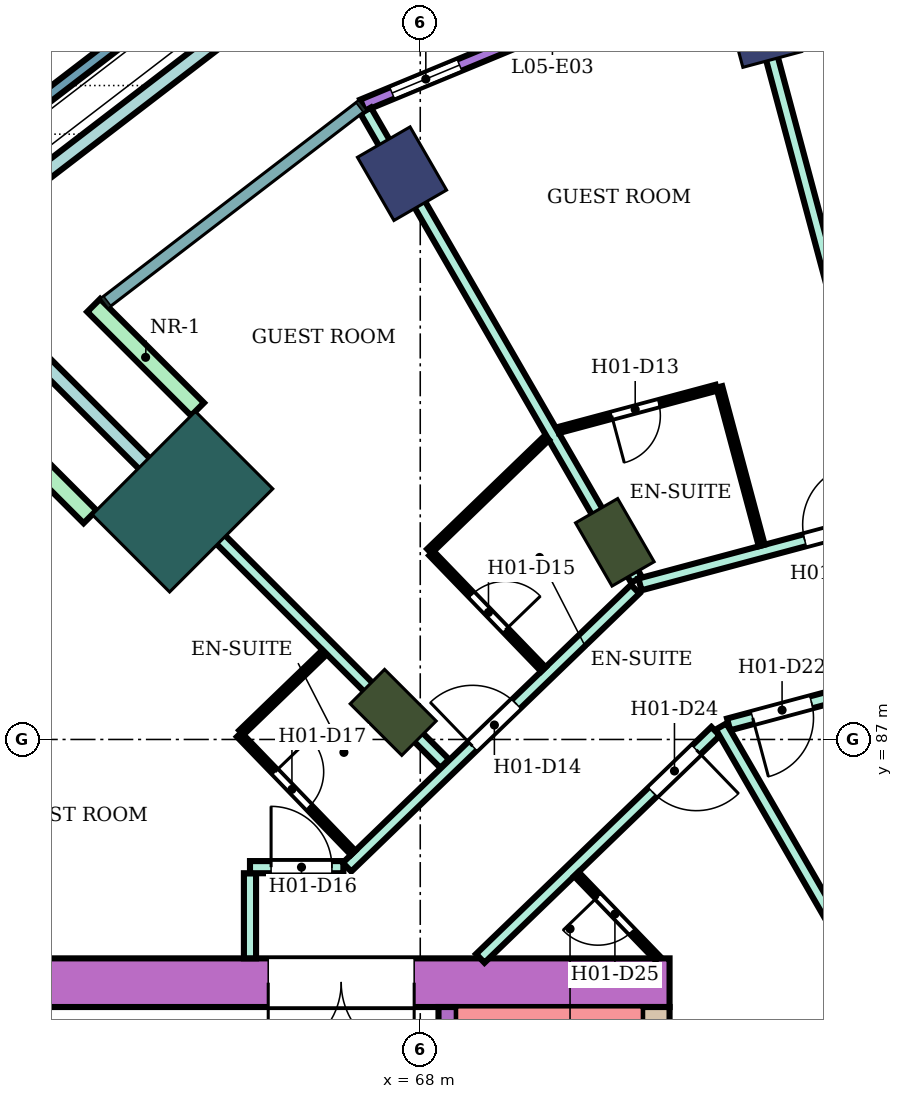
"""IFC4 building model, lengths in metres.
Left out: names, types, materials, properties, quantities, classifications, styles, units other than length and angle.
Written with IfcOpenShell. Run it as: python <this file> out.ifc"""

import sys

from ifc_helpers import new_model, si_unit, direction, frame, frame_2d, origin, origin_2d, place, context, subcontext, project, spatial, rectangle, extrude, element, fill, save


model = new_model("IFC4")
c1 = context("Model", 3, precision=1e-05, world=origin(), true_north=direction((0.0, 1.0)))
c2 = subcontext(c1, "Body", "Model", "MODEL_VIEW")
j1 = project(units=[si_unit("LENGTHUNIT", "METRE"), si_unit("PLANEANGLEUNIT", "RADIAN")], contexts=[c1])
p1 = place(None, origin())
s1 = spatial("IfcSite", under=j1, at=p1, CompositionType="ELEMENT")
p2 = place(p1, origin())
s2 = spatial("IfcBuilding", under=s1, at=p2, CompositionType="ELEMENT")
p3 = place(p2, frame((0.0, 0.0, 28.8)))
s3 = spatial("IfcBuildingStorey", under=s2, at=p3, CompositionType="ELEMENT", Elevation=28.8)
for number, where, z_axis, x_axis in (
    (1, (73.633, 98.762, 0.0), (0.0, 0.0, 1.0), (-0.259, 0.966, 0.0)),
    (2, (67.7, 96.304, 0.0), (0.0, 0.0, 1.0), (-0.5, 0.866, 0.0)),
):
    element("IfcColumn", number, at=place(p3, frame(where, z_axis=z_axis, x_axis=x_axis)), inside=s3, PredefinedType="COLUMN", context=c2, shape_type="SweptSolid", body=[
        extrude(rectangle(XDim=1.2, YDim=1.0, at=origin_2d()), origin(), (0.0, 0.0, 1.0), 3.8),
    ])
for number, where, z_axis, x_axis in (
    (3, (71.2, 90.242, 0.0), (0.0, 0.0, 1.0), (-0.5, 0.866, 0.0)),
    (4, (67.555, 87.445, 0.0), (0.0, 0.0, 1.0), (-0.707, 0.707, 0.0)),
):
    element("IfcColumn", number, at=place(p3, frame(where, z_axis=z_axis, x_axis=x_axis)), inside=s3, PredefinedType="COLUMN", context=c2, shape_type="SweptSolid", body=[
        extrude(rectangle(XDim=1.2, YDim=0.8, at=origin_2d()), origin(), (0.0, 0.0, 1.0), 3.8),
    ])
p4 = place(p3, frame((64.09, 90.91, 0.0), z_axis=(0.0, 0.0, 1.0), x_axis=(-0.707106781187, 0.707106781187, 0.0)))
e5 = element("IfcColumn", 5, at=p4, inside=s3, PredefinedType="COLUMN", context=c2, shape_type="SweptSolid", body=[
    extrude(rectangle(XDim=1.8, YDim=2.4, at=origin_2d()), origin(), (0.0, 0.0, 1.0), 3.8),
])
p5 = place(p3, frame((72.1, 83.0, 0.0), z_axis=(0.0, 0.0, 1.0), x_axis=(-1.0, 0.0, 0.0)))
e6 = element("IfcWall", 6, at=p5, inside=s3, PredefinedType="SHEAR", context=c2, shape_type="SweptSolid", body=[
    extrude(rectangle(XDim=14.7, YDim=0.8, at=frame_2d((7.35, 0.0))), origin(), (0.0, 0.0, 1.0), 3.48),
])
p6 = place(p5, frame((4.2, 0.0, 0.0)))
e7 = element("IfcOpeningElement", 7, at=p6, cuts=e6, PredefinedType="OPENING", context=c2, shape_type="SweptSolid", body=[
    extrude(rectangle(XDim=2.4, YDim=2.4, at=frame_2d((1.2, 1.2))), frame((0.0, 0.41, 0.0), z_axis=(0.0, -1.0, 0.0), x_axis=(1.0, 0.0, 0.0)), (0.0, 0.0, 1.0), 0.82),
])
p7 = place(p3, frame((71.875, 82.6, 0.0), z_axis=(0.0, 0.0, 1.0), x_axis=(0.0, -1.0, 0.0)))
e8 = element("IfcWall", 8, at=p7, inside=s3, PredefinedType="SHEAR", context=c2, shape_type="SweptSolid", body=[
    extrude(rectangle(XDim=7.6, YDim=0.45, at=frame_2d((3.8, 0.0))), origin(), (0.0, 0.0, 1.0), 3.48),
])
p8 = place(p3, frame((68.45, 82.6, 0.0), z_axis=(0.0, 0.0, 1.0), x_axis=(0.0, -1.0, 0.0)))
e9 = element("IfcWall", 9, at=p8, inside=s3, PredefinedType="SHEAR", context=c2, shape_type="SweptSolid", body=[
    extrude(rectangle(XDim=7.6, YDim=0.3, at=frame_2d((3.8, 0.0))), origin(), (0.0, 0.0, 1.0), 3.48),
])
p9 = place(p8, frame((0.25, 0.0, 0.0)))
e10 = element("IfcOpeningElement", 10, at=p9, cuts=e9, PredefinedType="OPENING", context=c2, shape_type="SweptSolid", body=[
    extrude(rectangle(XDim=0.9, YDim=2.1, at=frame_2d((0.45, 1.05))), frame((0.0, 0.16, 0.0), z_axis=(0.0, -1.0, 0.0), x_axis=(1.0, 0.0, 0.0)), (0.0, 0.0, 1.0), 0.32),
])
p10 = place(p3, frame((73.297, 100.017, 0.0), z_axis=(0.0, 0.0, 1.0), x_axis=(-0.923875115043, -0.382694096902, 0.0)))
e11 = element("IfcWall", 11, at=p10, inside=s3, PredefinedType="NOTDEFINED", context=c2, shape_type="SweptSolid", body=[
    extrude(rectangle(XDim=6.761, YDim=0.2, at=frame_2d((3.38, 0.0))), origin(), (0.0, 0.0, 1.0), 3.8),
])
p11 = place(p10, frame((0.527, 0.0, 0.9)))
e12 = element("IfcOpeningElement", 12, at=p11, cuts=e11, PredefinedType="OPENING", context=c2, shape_type="SweptSolid", body=[
    extrude(rectangle(XDim=1.2, YDim=2.4, at=frame_2d((0.6, 1.2))), frame((0.0, 0.11, 0.0), z_axis=(0.0, -1.0, 0.0), x_axis=(1.0, 0.0, 0.0)), (0.0, 0.0, 1.0), 0.22),
])
p12 = place(p10, frame((2.48, 0.0, 0.0)))
e13 = element("IfcOpeningElement", 13, at=p12, cuts=e11, PredefinedType="OPENING", context=c2, shape_type="SweptSolid", body=[
    extrude(rectangle(XDim=1.8, YDim=2.4, at=frame_2d((0.9, 1.2))), frame((0.0, 0.11, 0.0), z_axis=(0.0, -1.0, 0.0), x_axis=(1.0, 0.0, 0.0)), (0.0, 0.0, 1.0), 0.22),
])
p13 = place(p10, frame((5.034, 0.0, 0.9)))
e14 = element("IfcOpeningElement", 14, at=p13, cuts=e11, PredefinedType="OPENING", context=c2, shape_type="SweptSolid", body=[
    extrude(rectangle(XDim=1.2, YDim=2.4, at=frame_2d((0.6, 1.2))), frame((0.0, 0.11, 0.0), z_axis=(0.0, -1.0, 0.0), x_axis=(1.0, 0.0, 0.0)), (0.0, 0.0, 1.0), 0.22),
])
for number, where, z_axis, x_axis in (
    (15, (64.338, 92.43, 0.0), (0.0, 0.0, 1.0), (-0.707, 0.707, 0.0)),
    (16, (62.57, 90.662, 0.0), (0.0, 0.0, 1.0), (-0.707, 0.707, 0.0)),
):
    element("IfcWall", number, at=place(p3, frame(where, z_axis=z_axis, x_axis=x_axis)), inside=s3, PredefinedType="NOTDEFINED", context=c2, shape_type="SweptSolid", body=[
        extrude(rectangle(XDim=2.416, YDim=0.3, at=frame_2d((1.208, 0.0))), origin(), (0.0, 0.0, 1.0), 3.8),
    ])
p14 = place(p3, frame((59.365, 95.654, 0.0), z_axis=(0.0, 0.0, 1.0), x_axis=(0.793367808682, 0.608742572971, 0.0)))
e17 = element("IfcWall", 17, at=p14, inside=s3, PredefinedType="PARAPET", context=c2, shape_type="SweptSolid", body=[
    extrude(rectangle(XDim=7.596, YDim=0.2, at=frame_2d((3.798, 0.0))), origin(), (0.0, 0.0, 1.0), 1.1),
])
p15 = place(p3, frame((63.595, 91.405, 0.0), z_axis=(0.0, 0.0, 1.0), x_axis=(-0.707106781187, 0.707106781187, 0.0)))
e18 = element("IfcWall", 18, at=p15, inside=s3, PredefinedType="USERDEFINED", context=c2, shape_type="SweptSolid", body=[
    extrude(rectangle(XDim=4.846, YDim=0.25, at=frame_2d((2.423, 0.0))), origin(), (0.0, 0.0, 1.0), 0.6),
])
p16 = place(p3, frame((60.933, 95.635, 0.0), z_axis=(0.0, 0.0, 1.0), x_axis=(0.793355967101, 0.608758005668, 0.0)))
e19 = element("IfcWall", 19, at=p16, inside=s3, PredefinedType="USERDEFINED", context=c2, shape_type="SweptSolid", body=[
    extrude(rectangle(XDim=6.232, YDim=0.25, at=frame_2d((3.116, 0.0))), origin(), (0.0, 0.0, 1.0), 0.6),
])
p17 = place(p3, frame((63.599, 91.408, 0.0), z_axis=(0.0, 0.0, 1.0), x_axis=(0.706981017422, -0.707232522587, 0.0)))
e20 = element("IfcWall", 20, at=p17, inside=s3, PredefinedType="PARTITIONING", context=c2, shape_type="SweptSolid", body=[
    extrude(rectangle(XDim=6.795, YDim=0.2, at=frame_2d((3.397, 0.0))), origin(), (0.0, 0.0, 1.0), 3.35),
])
p18 = place(p3, frame((65.2, 83.401, 0.0), z_axis=(0.0, 0.0, 1.0), x_axis=(0.0, 1.0, 0.0)))
e21 = element("IfcWall", 21, at=p18, inside=s3, PredefinedType="PARTITIONING", context=c2, shape_type="SweptSolid", body=[
    extrude(rectangle(XDim=1.399, YDim=0.2, at=frame_2d((0.7, 0.0))), origin(), (0.0, 0.0, 1.0), 3.35),
])
p19 = place(p3, frame((65.2, 84.9, 0.0), z_axis=(0.0, 0.0, 1.0), x_axis=(1.0, 0.0, 0.0)))
e22 = element("IfcWall", 22, at=p19, inside=s3, PredefinedType="PARTITIONING", context=c2, shape_type="SweptSolid", body=[
    extrude(rectangle(XDim=1.536, YDim=0.2, at=frame_2d((0.768, 0.0))), origin(), (0.0, 0.0, 1.0), 3.35),
])
p20 = place(p19, frame((0.347, 0.0, 0.0)))
e23 = element("IfcOpeningElement", 23, at=p20, cuts=e22, PredefinedType="OPENING", context=c2, shape_type="SweptSolid", body=[
    extrude(rectangle(XDim=1.0, YDim=2.1, at=frame_2d((0.5, 1.05))), frame((0.0, 0.11, 0.0), z_axis=(0.0, -1.0, 0.0), x_axis=(1.0, 0.0, 0.0)), (0.0, 0.0, 1.0), 0.22),
])
p21 = place(p3, frame((66.796, 84.9, 0.0), z_axis=(0.0, 0.0, 1.0), x_axis=(0.719690131178, 0.694295409092, 0.0)))
e24 = element("IfcWall", 24, at=p21, inside=s3, PredefinedType="PARTITIONING", context=c2, shape_type="SweptSolid", body=[
    extrude(rectangle(XDim=6.585, YDim=0.2, at=frame_2d((3.293, 0.0))), origin(), (0.0, 0.0, 1.0), 3.35),
])
p22 = place(p21, frame((2.867, 0.0, 0.0)))
e25 = element("IfcOpeningElement", 25, at=p22, cuts=e24, PredefinedType="OPENING", context=c2, shape_type="SweptSolid", body=[
    extrude(rectangle(XDim=1.0, YDim=2.1, at=frame_2d((0.5, 1.05))), frame((0.0, 0.11, 0.0), z_axis=(0.0, -1.0, 0.0), x_axis=(1.0, 0.0, 0.0)), (0.0, 0.0, 1.0), 0.22),
])
p23 = place(p3, frame((67.102, 97.342, 0.0), z_axis=(0.0, 0.0, 1.0), x_axis=(0.499944680089, -0.866057340394, 0.0)))
e26 = element("IfcWall", 26, at=p23, inside=s3, PredefinedType="PARTITIONING", context=c2, shape_type="SweptSolid", body=[
    extrude(rectangle(XDim=8.908, YDim=0.2, at=frame_2d((4.454, 0.0))), origin(), (0.0, 0.0, 1.0), 3.35),
])
p24 = place(p3, frame((68.987, 83.4, 0.0), z_axis=(0.0, 0.0, 1.0), x_axis=(0.719591503389, 0.694397629784, 0.0)))
e27 = element("IfcWall", 27, at=p24, inside=s3, PredefinedType="PARTITIONING", context=c2, shape_type="SweptSolid", body=[
    extrude(rectangle(XDim=5.378, YDim=0.2, at=frame_2d((2.689, 0.0))), origin(), (0.0, 0.0, 1.0), 3.35),
])
p25 = place(p24, frame((3.938, 0.0, 0.0)))
e28 = element("IfcOpeningElement", 28, at=p25, cuts=e27, PredefinedType="OPENING", context=c2, shape_type="SweptSolid", body=[
    extrude(rectangle(XDim=1.0, YDim=2.1, at=frame_2d((0.5, 1.05))), frame((0.0, 0.11, 0.0), z_axis=(0.0, -1.0, 0.0), x_axis=(1.0, 0.0, 0.0)), (0.0, 0.0, 1.0), 0.22),
])
p26 = place(p3, frame((71.614, 89.55, 0.0), z_axis=(0.0, 0.0, 1.0), x_axis=(0.965982156828, 0.258608725086, 0.0)))
e29 = element("IfcWall", 29, at=p26, inside=s3, PredefinedType="PARTITIONING", context=c2, shape_type="SweptSolid", body=[
    extrude(rectangle(XDim=8.592, YDim=0.2, at=frame_2d((4.296, 0.0))), origin(), (0.0, 0.0, 1.0), 3.35),
])
p27 = place(p26, frame((4.865, 0.0, 0.0)))
e30 = element("IfcOpeningElement", 30, at=p27, cuts=e29, PredefinedType="OPENING", context=c2, shape_type="SweptSolid", body=[
    extrude(rectangle(XDim=1.0, YDim=2.1, at=frame_2d((0.5, 1.05))), frame((0.0, 0.11, 0.0), z_axis=(0.0, -1.0, 0.0), x_axis=(1.0, 0.0, 0.0)), (0.0, 0.0, 1.0), 0.22),
])
p28 = place(p26, frame((2.804, 0.0, 0.0)))
e31 = element("IfcOpeningElement", 31, at=p28, cuts=e29, PredefinedType="OPENING", context=c2, shape_type="SweptSolid", body=[
    extrude(rectangle(XDim=1.0, YDim=2.1, at=frame_2d((0.5, 1.05))), frame((0.0, 0.11, 0.0), z_axis=(0.0, -1.0, 0.0), x_axis=(1.0, 0.0, 0.0)), (0.0, 0.0, 1.0), 0.22),
])
p29 = place(p3, frame((73.071, 87.247, 0.0), z_axis=(0.0, 0.0, 1.0), x_axis=(0.965931651205, 0.258797305243, 0.0)))
e32 = element("IfcWall", 32, at=p29, inside=s3, PredefinedType="PARTITIONING", context=c2, shape_type="SweptSolid", body=[
    extrude(rectangle(XDim=7.043, YDim=0.2, at=frame_2d((3.521, 0.0))), origin(), (0.0, 0.0, 1.0), 3.35),
])
p30 = place(p29, frame((0.41, 0.0, 0.0)))
e33 = element("IfcOpeningElement", 33, at=p30, cuts=e32, PredefinedType="OPENING", context=c2, shape_type="SweptSolid", body=[
    extrude(rectangle(XDim=1.0, YDim=2.1, at=frame_2d((0.5, 1.05))), frame((0.0, 0.11, 0.0), z_axis=(0.0, -1.0, 0.0), x_axis=(1.0, 0.0, 0.0)), (0.0, 0.0, 1.0), 0.22),
])
p31 = place(p3, frame((72.948, 87.214, 0.0), z_axis=(0.0, 0.0, 1.0), x_axis=(0.499943524694, -0.866058007363, 0.0)))
e34 = element("IfcWall", 34, at=p31, inside=s3, PredefinedType="PARTITIONING", context=c2, shape_type="SweptSolid", body=[
    extrude(rectangle(XDim=6.405, YDim=0.2, at=frame_2d((3.203, 0.0))), origin(), (0.0, 0.0, 1.0), 3.35),
])
p32 = place(p3, frame((73.323, 99.919, 0.0), z_axis=(0.0, 0.0, 1.0), x_axis=(0.258817230439, -0.965926312525, 0.0)))
e35 = element("IfcWall", 35, at=p32, inside=s3, PredefinedType="PARTITIONING", context=c2, shape_type="SweptSolid", body=[
    extrude(rectangle(XDim=9.474, YDim=0.2, at=frame_2d((4.737, 0.0))), origin(), (0.0, 0.0, 1.0), 3.35),
])
p33 = place(p3, frame((65.058, 87.114, 0.0), z_axis=(0.0, 0.0, 1.0), x_axis=(0.719715847356, 0.694268751324, 0.0)))
e36 = element("IfcWall", 36, at=p33, inside=s3, PredefinedType="PARTITIONING", context=c2, shape_type="SweptSolid", body=[
    extrude(rectangle(XDim=1.9, YDim=0.1, at=frame_2d((0.95, 0.0))), origin(), (0.0, 0.0, 1.0), 3.35),
])
p34 = place(p3, frame((65.022, 87.079, 0.0), z_axis=(0.0, 0.0, 1.0), x_axis=(0.694287838235, -0.719697434815, 0.0)))
e37 = element("IfcWall", 37, at=p34, inside=s3, PredefinedType="PARTITIONING", context=c2, shape_type="SweptSolid", body=[
    extrude(rectangle(XDim=2.7, YDim=0.1, at=frame_2d((1.35, 0.0))), origin(), (0.0, 0.0, 1.0), 3.35),
])
p35 = place(p34, frame((0.85, 0.0, 0.0)))
e38 = element("IfcOpeningElement", 38, at=p35, cuts=e37, PredefinedType="OPENING", context=c2, shape_type="SweptSolid", body=[
    extrude(rectangle(XDim=0.8, YDim=2.1, at=frame_2d((0.4, 1.05))), frame((0.0, 0.06, 0.0), z_axis=(0.0, -1.0, 0.0), x_axis=(1.0, 0.0, 0.0)), (0.0, 0.0, 1.0), 0.12),
])
p36 = place(p3, frame((68.185, 90.06, 0.0), z_axis=(0.0, 0.0, 1.0), x_axis=(0.69446127412, -0.719530081892, 0.0)))
e39 = element("IfcWall", 39, at=p36, inside=s3, PredefinedType="PARTITIONING", context=c2, shape_type="SweptSolid", body=[
    extrude(rectangle(XDim=2.649, YDim=0.1, at=frame_2d((1.324, 0.0))), origin(), (0.0, 0.0, 1.0), 3.35),
])
p37 = place(p36, frame((0.95, 0.0, 0.0)))
e40 = element("IfcOpeningElement", 40, at=p37, cuts=e39, PredefinedType="OPENING", context=c2, shape_type="SweptSolid", body=[
    extrude(rectangle(XDim=0.8, YDim=2.1, at=frame_2d((0.4, 1.05))), frame((0.0, 0.06, 0.0), z_axis=(0.0, -1.0, 0.0), x_axis=(1.0, 0.0, 0.0)), (0.0, 0.0, 1.0), 0.12),
])
p38 = place(p3, frame((68.15, 90.096, 0.0), z_axis=(0.0, 0.0, 1.0), x_axis=(0.719669144226, 0.694317163009, 0.0)))
e41 = element("IfcWall", 41, at=p38, inside=s3, PredefinedType="PARTITIONING", context=c2, shape_type="SweptSolid", body=[
    extrude(rectangle(XDim=2.687, YDim=0.1, at=frame_2d((1.343, 0.0))), origin(), (0.0, 0.0, 1.0), 3.35),
])
p39 = place(p3, frame((70.268, 92.087, 0.0), z_axis=(0.0, 0.0, 1.0), x_axis=(0.965931867509, 0.258796497911, 0.0)))
e42 = element("IfcWall", 42, at=p39, inside=s3, PredefinedType="PARTITIONING", context=c2, shape_type="SweptSolid", body=[
    extrude(rectangle(XDim=2.693, YDim=0.1, at=frame_2d((1.347, 0.0))), origin(), (0.0, 0.0, 1.0), 3.35),
])
p40 = place(p39, frame((0.912, 0.0, 0.0)))
e43 = element("IfcOpeningElement", 43, at=p40, cuts=e42, PredefinedType="OPENING", context=c2, shape_type="SweptSolid", body=[
    extrude(rectangle(XDim=0.8, YDim=2.1, at=frame_2d((0.4, 1.05))), frame((0.0, 0.06, 0.0), z_axis=(0.0, -1.0, 0.0), x_axis=(1.0, 0.0, 0.0)), (0.0, 0.0, 1.0), 0.12),
])
p41 = place(p3, frame((70.567, 84.786, 0.0), z_axis=(0.0, 0.0, 1.0), x_axis=(0.694447472534, -0.719543402368, 0.0)))
e44 = element("IfcWall", 44, at=p41, inside=s3, PredefinedType="PARTITIONING", context=c2, shape_type="SweptSolid", body=[
    extrude(rectangle(XDim=1.926, YDim=0.1, at=frame_2d((0.963, 0.0))), origin(), (0.0, 0.0, 1.0), 3.35),
])
p42 = place(p41, frame((0.513, 0.0, 0.0)))
e45 = element("IfcOpeningElement", 45, at=p42, cuts=e44, PredefinedType="OPENING", context=c2, shape_type="SweptSolid", body=[
    extrude(rectangle(XDim=0.8, YDim=2.1, at=frame_2d((0.4, 1.05))), frame((0.0, 0.06, 0.0), z_axis=(0.0, -1.0, 0.0), x_axis=(1.0, 0.0, 0.0)), (0.0, 0.0, 1.0), 0.12),
])
p43 = place(p3, frame((72.918, 92.797, 0.0), z_axis=(0.0, 0.0, 1.0), x_axis=(0.25867580527, -0.965964195904, 0.0)))
e46 = element("IfcWall", 46, at=p43, inside=s3, PredefinedType="PARTITIONING", context=c2, shape_type="SweptSolid", body=[
    extrude(rectangle(XDim=2.699, YDim=0.1, at=frame_2d((1.35, 0.0))), origin(), (0.0, 0.0, 1.0), 3.35),
])
p44 = place(p13, origin())
e47 = element("IfcWindow", 47, at=p44, inside=s3, PartitioningType="SINGLE_PANEL", PredefinedType="WINDOW", context=c2, shape_type="SweptSolid", body=[
    extrude(rectangle(XDim=1.2, YDim=2.4, at=frame_2d((0.6, 1.2))), frame((0.0, 0.03, 0.0), z_axis=(0.0, -1.0, 0.0), x_axis=(1.0, 0.0, 0.0)), (0.0, 0.0, 1.0), 0.06),
])
fill(e14, e47)
p45 = place(p28, origin())
e48 = element("IfcDoor", 48, at=p45, inside=s3, OperationType="SINGLE_SWING_RIGHT", PredefinedType="DOOR", context=c2, shape_type="SweptSolid", body=[
    extrude(rectangle(XDim=1.0, YDim=2.1, at=frame_2d((0.5, 1.05))), frame((0.0, 0.025, 0.0), z_axis=(0.0, -1.0, 0.0), x_axis=(1.0, 0.0, 0.0)), (0.0, 0.0, 1.0), 0.05),
])
fill(e31, e48)
p46 = place(p40, frame((0.8, 0.0, 0.0), z_axis=(0.0, 0.0, 1.0), x_axis=(-1.0, 0.0, 0.0)))
e49 = element("IfcDoor", 49, at=p46, inside=s3, OperationType="SINGLE_SWING_RIGHT", PredefinedType="DOOR", context=c2, shape_type="SweptSolid", body=[
    extrude(rectangle(XDim=0.8, YDim=2.1, at=frame_2d((0.4, 1.05))), frame((0.0, 0.025, 0.0), z_axis=(0.0, -1.0, 0.0), x_axis=(1.0, 0.0, 0.0)), (0.0, 0.0, 1.0), 0.05),
])
fill(e43, e49)
p47 = place(p22, origin())
e50 = element("IfcDoor", 50, at=p47, inside=s3, OperationType="SINGLE_SWING_LEFT", PredefinedType="DOOR", context=c2, shape_type="SweptSolid", body=[
    extrude(rectangle(XDim=1.0, YDim=2.1, at=frame_2d((0.5, 1.05))), frame((0.0, 0.025, 0.0), z_axis=(0.0, -1.0, 0.0), x_axis=(1.0, 0.0, 0.0)), (0.0, 0.0, 1.0), 0.05),
])
fill(e25, e50)
p48 = place(p37, origin())
e51 = element("IfcDoor", 51, at=p48, inside=s3, OperationType="SINGLE_SWING_RIGHT", PredefinedType="DOOR", context=c2, shape_type="SweptSolid", body=[
    extrude(rectangle(XDim=0.8, YDim=2.1, at=frame_2d((0.4, 1.05))), frame((0.0, 0.025, 0.0), z_axis=(0.0, -1.0, 0.0), x_axis=(1.0, 0.0, 0.0)), (0.0, 0.0, 1.0), 0.05),
])
fill(e40, e51)
p49 = place(p20, origin())
e52 = element("IfcDoor", 52, at=p49, inside=s3, OperationType="SINGLE_SWING_LEFT", PredefinedType="DOOR", context=c2, shape_type="SweptSolid", body=[
    extrude(rectangle(XDim=1.0, YDim=2.1, at=frame_2d((0.5, 1.05))), frame((0.0, 0.025, 0.0), z_axis=(0.0, -1.0, 0.0), x_axis=(1.0, 0.0, 0.0)), (0.0, 0.0, 1.0), 0.05),
])
fill(e23, e52)
p50 = place(p35, origin())
e53 = element("IfcDoor", 53, at=p50, inside=s3, OperationType="SINGLE_SWING_LEFT", PredefinedType="DOOR", context=c2, shape_type="SweptSolid", body=[
    extrude(rectangle(XDim=0.8, YDim=2.1, at=frame_2d((0.4, 1.05))), frame((0.0, 0.025, 0.0), z_axis=(0.0, -1.0, 0.0), x_axis=(1.0, 0.0, 0.0)), (0.0, 0.0, 1.0), 0.05),
])
fill(e38, e53)
p51 = place(p30, frame((1.0, 0.0, 0.0), z_axis=(0.0, 0.0, 1.0), x_axis=(-1.0, 0.0, 0.0)))
e54 = element("IfcDoor", 54, at=p51, inside=s3, OperationType="SINGLE_SWING_RIGHT", PredefinedType="DOOR", context=c2, shape_type="SweptSolid", body=[
    extrude(rectangle(XDim=1.0, YDim=2.1, at=frame_2d((0.5, 1.05))), frame((0.0, 0.025, 0.0), z_axis=(0.0, -1.0, 0.0), x_axis=(1.0, 0.0, 0.0)), (0.0, 0.0, 1.0), 0.05),
])
fill(e33, e54)
p52 = place(p25, frame((1.0, 0.0, 0.0), z_axis=(0.0, 0.0, 1.0), x_axis=(-1.0, 0.0, 0.0)))
e55 = element("IfcDoor", 55, at=p52, inside=s3, OperationType="SINGLE_SWING_LEFT", PredefinedType="DOOR", context=c2, shape_type="SweptSolid", body=[
    extrude(rectangle(XDim=1.0, YDim=2.1, at=frame_2d((0.5, 1.05))), frame((0.0, 0.025, 0.0), z_axis=(0.0, -1.0, 0.0), x_axis=(1.0, 0.0, 0.0)), (0.0, 0.0, 1.0), 0.05),
])
fill(e28, e55)
p53 = place(p42, frame((0.8, 0.0, 0.0), z_axis=(0.0, 0.0, 1.0), x_axis=(-1.0, 0.0, 0.0)))
e56 = element("IfcDoor", 56, at=p53, inside=s3, OperationType="SINGLE_SWING_RIGHT", PredefinedType="DOOR", context=c2, shape_type="SweptSolid", body=[
    extrude(rectangle(XDim=0.8, YDim=2.1, at=frame_2d((0.4, 1.05))), frame((0.0, 0.025, 0.0), z_axis=(0.0, -1.0, 0.0), x_axis=(1.0, 0.0, 0.0)), (0.0, 0.0, 1.0), 0.05),
])
fill(e45, e56)
p54 = place(p6, origin())
e57 = element("IfcDoor", 57, at=p54, inside=s3, OperationType="DOUBLE_DOOR_SINGLE_SWING", PredefinedType="DOOR", context=c2, shape_type="SweptSolid", body=[
    extrude(rectangle(XDim=2.4, YDim=2.4, at=frame_2d((1.2, 1.2))), frame((0.0, 0.025, 0.0), z_axis=(0.0, -1.0, 0.0), x_axis=(1.0, 0.0, 0.0)), (0.0, 0.0, 1.0), 0.05),
])
fill(e7, e57)
save(model, sys.argv[1])
